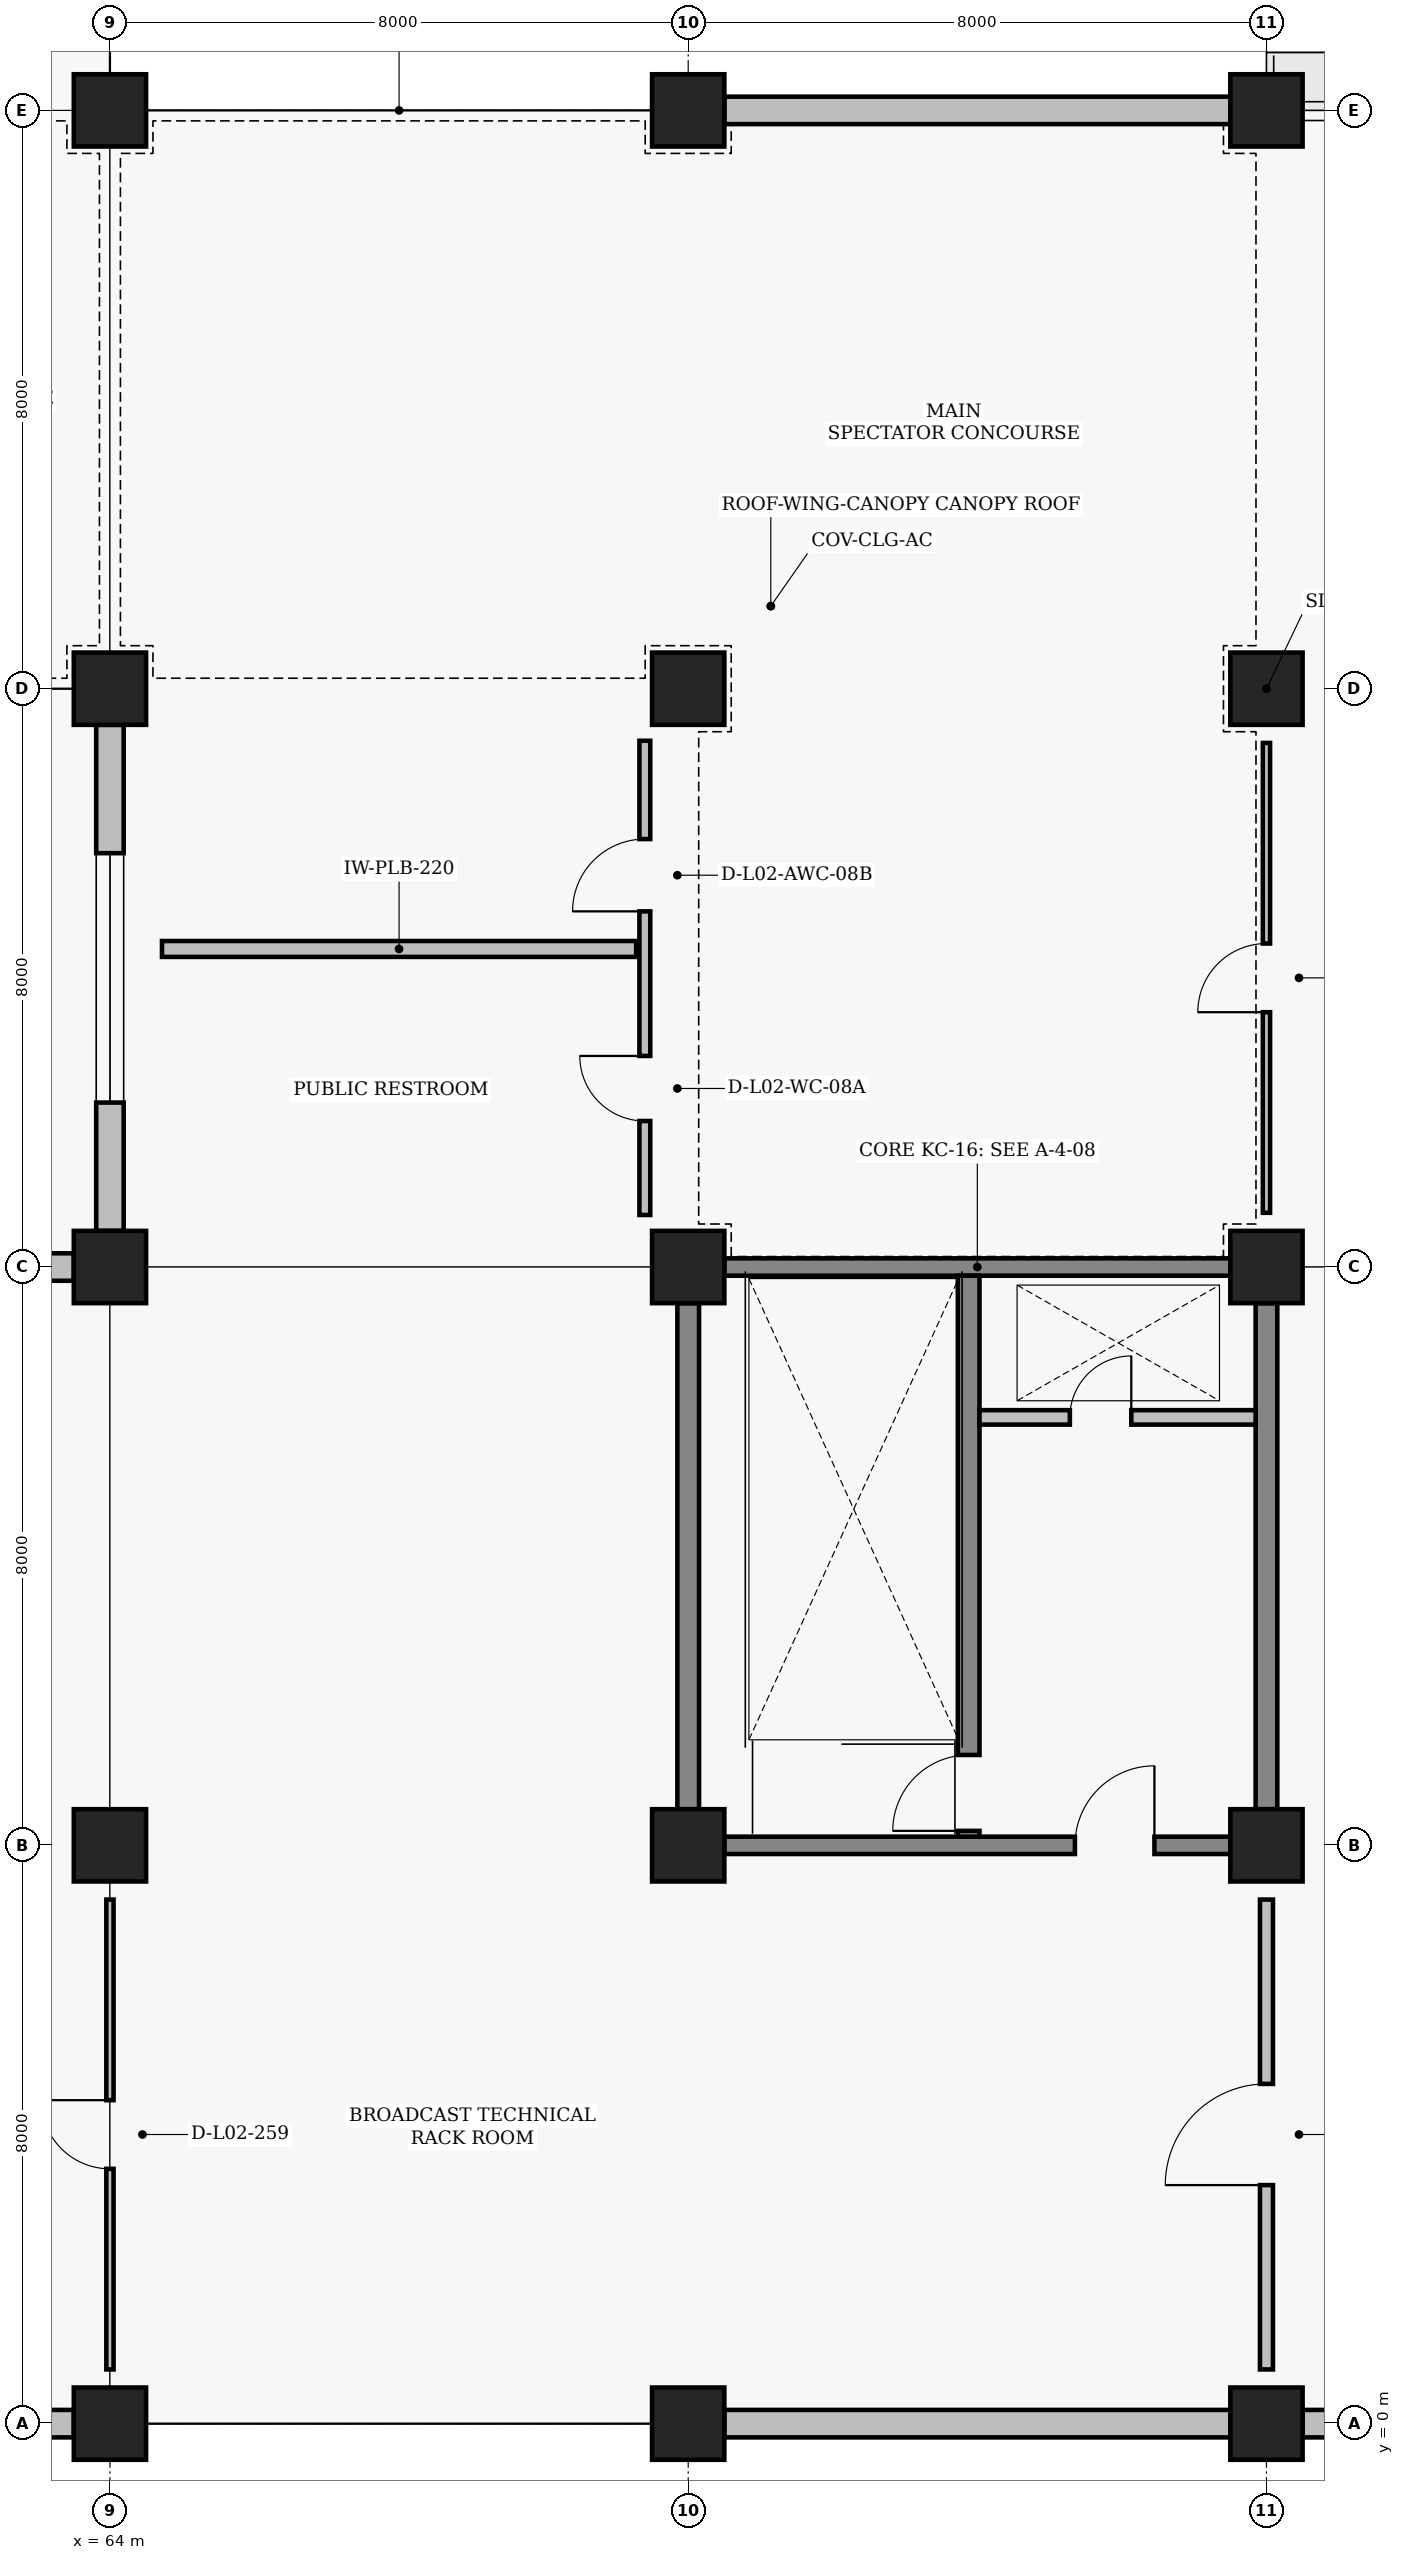
"""IFC4 building model, lengths in metres.
Left out: names, types, materials, properties, quantities, classifications, styles, units other than length and angle.
Written with IfcOpenShell. Run it as: python <this file> out.ifc"""

import sys

from ifc_helpers import new_model, si_unit, direction, frame, frame_2d, origin, origin_2d, place, context, subcontext, project, spatial, rectangle, extrude, element, fill, save


model = new_model("IFC4")
c1 = context("Model", 3, precision=1e-05, world=origin(), true_north=direction((0.0, 1.0)))
c2 = subcontext(c1, "Body", "Model", "MODEL_VIEW")
j1 = project(units=[si_unit("LENGTHUNIT", "METRE"), si_unit("PLANEANGLEUNIT", "RADIAN")], contexts=[c1])
p1 = place(None, origin())
s1 = spatial("IfcSite", under=j1, at=p1, CompositionType="ELEMENT")
p2 = place(p1, origin())
s2 = spatial("IfcBuilding", under=s1, at=p2, CompositionType="ELEMENT")
p3 = place(p2, frame((0.0, 0.0, 4.8)))
s3 = spatial("IfcBuildingStorey", under=s2, at=p3, CompositionType="ELEMENT", Elevation=4.8)
for number, where, z_axis, x_axis in (
    (1, (64.0, 0.0, 0.0), (0.0, 0.0, 1.0), (1.0, 0.0, 0.0)),
    (2, (64.0, 8.0, 0.0), (0.0, 0.0, 1.0), (1.0, 0.0, 0.0)),
    (3, (64.0, 16.0, 0.0), (0.0, 0.0, 1.0), (1.0, 0.0, 0.0)),
    (4, (64.0, 24.0, 0.0), (0.0, 0.0, 1.0), (1.0, 0.0, 0.0)),
    (5, (64.0, 32.0, 0.0), (0.0, 0.0, 1.0), (1.0, 0.0, 0.0)),
    (6, (72.0, 0.0, 0.0), (0.0, 0.0, 1.0), (1.0, 0.0, 0.0)),
    (7, (72.0, 8.0, 0.0), (0.0, 0.0, 1.0), (1.0, 0.0, 0.0)),
    (8, (72.0, 16.0, 0.0), (0.0, 0.0, 1.0), (1.0, 0.0, 0.0)),
    (9, (72.0, 24.0, 0.0), (0.0, 0.0, 1.0), (1.0, 0.0, 0.0)),
    (10, (72.0, 32.0, 0.0), (0.0, 0.0, 1.0), (1.0, 0.0, 0.0)),
    (11, (80.0, 0.0, 0.0), (0.0, 0.0, 1.0), (1.0, 0.0, 0.0)),
    (12, (80.0, 8.0, 0.0), (0.0, 0.0, 1.0), (1.0, 0.0, 0.0)),
    (13, (80.0, 16.0, 0.0), (0.0, 0.0, 1.0), (1.0, 0.0, 0.0)),
    (14, (80.0, 24.0, 0.0), (0.0, 0.0, 1.0), (1.0, 0.0, 0.0)),
    (15, (80.0, 32.0, 0.0), (0.0, 0.0, 1.0), (1.0, 0.0, 0.0)),
):
    element("IfcColumn", number, at=place(p3, frame(where, z_axis=z_axis, x_axis=x_axis)), inside=s3, PredefinedType="COLUMN", context=c2, shape_type="SweptSolid", body=[
        extrude(rectangle(XDim=1.0, YDim=1.0, at=origin_2d()), origin(), (0.0, 0.0, 1.0), 4.8),
    ])
p4 = place(p3, frame((56.5, 0.0, 0.0), z_axis=(0.0, 0.0, 1.0), x_axis=(1.0, 0.0, 0.0)))
e16 = element("IfcWall", 16, at=p4, inside=s3, PredefinedType="SOLIDWALL", context=c2, shape_type="SweptSolid", body=[
    extrude(rectangle(XDim=7.0, YDim=0.38, at=frame_2d((3.5, 0.0))), origin(), (0.0, 0.0, 1.0), 3.95),
])
p5 = place(p3, frame((56.5, 16.0, 0.0), z_axis=(0.0, 0.0, 1.0), x_axis=(1.0, 0.0, 0.0)))
e17 = element("IfcWall", 17, at=p5, inside=s3, PredefinedType="SOLIDWALL", context=c2, shape_type="SweptSolid", body=[
    extrude(rectangle(XDim=7.0, YDim=0.38, at=frame_2d((3.5, 0.0))), origin(), (0.0, 0.0, 1.0), 3.91),
])
p6 = place(p3, frame((64.0, 16.5, 0.0), z_axis=(0.0, 0.0, 1.0), x_axis=(0.0, 1.0, 0.0)))
e18 = element("IfcWall", 18, at=p6, inside=s3, PredefinedType="SOLIDWALL", context=c2, shape_type="SweptSolid", body=[
    extrude(rectangle(XDim=7.0, YDim=0.38, at=frame_2d((3.5, 0.0))), origin(), (0.0, 0.0, 1.0), 3.91),
])
p7 = place(p6, frame((1.775, 0.0, 0.95)))
e19 = element("IfcOpeningElement", 19, at=p7, cuts=e18, PredefinedType="OPENING", context=c2, shape_type="SweptSolid", body=[
    extrude(rectangle(XDim=3.45, YDim=2.2, at=frame_2d((1.725, 1.1))), frame((0.0, 0.2, 0.0), z_axis=(0.0, -1.0, 0.0), x_axis=(1.0, 0.0, 0.0)), (0.0, 0.0, 1.0), 0.4),
])
p8 = place(p3, frame((72.5, 0.0, 0.0), z_axis=(0.0, 0.0, 1.0), x_axis=(1.0, 0.0, 0.0)))
e20 = element("IfcWall", 20, at=p8, inside=s3, PredefinedType="SOLIDWALL", context=c2, shape_type="SweptSolid", body=[
    extrude(rectangle(XDim=7.0, YDim=0.38, at=frame_2d((3.5, 0.0))), origin(), (0.0, 0.0, 1.0), 3.95),
])
p9 = place(p3, frame((72.5, 32.0, 0.0), z_axis=(0.0, 0.0, 1.0), x_axis=(1.0, 0.0, 0.0)))
e21 = element("IfcWall", 21, at=p9, inside=s3, PredefinedType="SOLIDWALL", context=c2, shape_type="SweptSolid", body=[
    extrude(rectangle(XDim=7.0, YDim=0.38, at=frame_2d((3.5, 0.0))), origin(), (0.0, 0.0, 1.0), 3.91),
])
p10 = place(p3, frame((80.5, 0.0, 0.0), z_axis=(0.0, 0.0, 1.0), x_axis=(1.0, 0.0, 0.0)))
e22 = element("IfcWall", 22, at=p10, inside=s3, PredefinedType="SOLIDWALL", context=c2, shape_type="SweptSolid", body=[
    extrude(rectangle(XDim=7.0, YDim=0.38, at=frame_2d((3.5, 0.0))), origin(), (0.0, 0.0, 1.0), 3.95),
])
p11 = place(p10, frame((2.1, 0.0, 1.9)))
e23 = element("IfcOpeningElement", 23, at=p11, cuts=e22, PredefinedType="OPENING", context=c2, shape_type="SweptSolid", body=[
    extrude(rectangle(XDim=2.8, YDim=1.1, at=frame_2d((1.4, 0.55))), frame((0.0, 0.2, 0.0), z_axis=(0.0, -1.0, 0.0), x_axis=(1.0, 0.0, 0.0)), (0.0, 0.0, 1.0), 0.4),
])
p12 = place(p3, frame((72.5, 8.0, 0.0), z_axis=(0.0, 0.0, 1.0), x_axis=(1.0, 0.0, 0.0)))
e24 = element("IfcWall", 24, at=p12, inside=s3, PredefinedType="SHEAR", context=c2, shape_type="SweptSolid", body=[
    extrude(rectangle(XDim=7.0, YDim=0.24, at=frame_2d((3.5, 0.0))), origin(), (0.0, 0.0, 1.0), 3.97),
])
p13 = place(p12, frame((4.85, 0.0, 0.0)))
e25 = element("IfcOpeningElement", 25, at=p13, cuts=e24, PredefinedType="OPENING", context=c2, shape_type="SweptSolid", body=[
    extrude(rectangle(XDim=1.1, YDim=2.2, at=frame_2d((0.55, 1.1))), frame((0.0, 0.13, 0.0), z_axis=(0.0, -1.0, 0.0), x_axis=(1.0, 0.0, 0.0)), (0.0, 0.0, 1.0), 0.26),
])
p14 = place(p3, frame((72.5, 16.0, 0.0), z_axis=(0.0, 0.0, 1.0), x_axis=(1.0, 0.0, 0.0)))
e26 = element("IfcWall", 26, at=p14, inside=s3, PredefinedType="SHEAR", context=c2, shape_type="SweptSolid", body=[
    extrude(rectangle(XDim=7.0, YDim=0.24, at=frame_2d((3.5, 0.0))), origin(), (0.0, 0.0, 1.0), 3.61),
])
p15 = place(p3, frame((72.0, 8.5, 0.0), z_axis=(0.0, 0.0, 1.0), x_axis=(0.0, 1.0, 0.0)))
e27 = element("IfcWall", 27, at=p15, inside=s3, PredefinedType="SHEAR", context=c2, shape_type="SweptSolid", body=[
    extrude(rectangle(XDim=7.0, YDim=0.3, at=frame_2d((3.5, 0.0))), origin(), (0.0, 0.0, 1.0), 3.91),
])
p16 = place(p3, frame((80.0, 8.5, 0.0), z_axis=(0.0, 0.0, 1.0), x_axis=(0.0, 1.0, 0.0)))
e28 = element("IfcWall", 28, at=p16, inside=s3, PredefinedType="SHEAR", context=c2, shape_type="SweptSolid", body=[
    extrude(rectangle(XDim=7.0, YDim=0.3, at=frame_2d((3.5, 0.0))), origin(), (0.0, 0.0, 1.0), 3.61),
])
p17 = place(p3, frame((75.88, 8.12, 0.0), z_axis=(0.0, 0.0, 1.0), x_axis=(0.0, 1.0, 0.0)))
e29 = element("IfcWall", 29, at=p17, inside=s3, PredefinedType="SHEAR", context=c2, shape_type="SweptSolid", body=[
    extrude(rectangle(XDim=7.76, YDim=0.3, at=frame_2d((3.88, 0.0))), origin(), (0.0, 0.0, 1.0), 4.01),
])
p18 = place(p17, frame((0.08, 0.0, 0.0)))
e30 = element("IfcOpeningElement", 30, at=p18, cuts=e29, PredefinedType="OPENING", context=c2, shape_type="SweptSolid", body=[
    extrude(rectangle(XDim=1.05, YDim=2.15, at=frame_2d((0.525, 1.075))), frame((0.0, 0.16, 0.0), z_axis=(0.0, -1.0, 0.0), x_axis=(1.0, 0.0, 0.0)), (0.0, 0.0, 1.0), 0.32),
])
p19 = place(p3, frame((76.03, 13.92, 0.0), z_axis=(0.0, 0.0, 1.0), x_axis=(1.0, 0.0, 0.0)))
e31 = element("IfcWall", 31, at=p19, inside=s3, PredefinedType="PARTITIONING", context=c2, shape_type="SweptSolid", body=[
    extrude(rectangle(XDim=3.82, YDim=0.2, at=frame_2d((1.91, 0.0))), origin(), (0.0, 0.0, 1.0), 3.97),
])
p20 = place(p19, frame((1.25, 0.0, 0.0)))
e32 = element("IfcOpeningElement", 32, at=p20, cuts=e31, PredefinedType="OPENING", context=c2, shape_type="SweptSolid", body=[
    extrude(rectangle(XDim=0.85, YDim=2.05, at=frame_2d((0.425, 1.025))), frame((0.0, 0.11, 0.0), z_axis=(0.0, -1.0, 0.0), x_axis=(1.0, 0.0, 0.0)), (0.0, 0.0, 1.0), 0.22),
])
p21 = place(p3, frame((64.72, 20.4, 0.0), z_axis=(0.0, 0.0, 1.0), x_axis=(1.0, 0.0, 0.0)))
e33 = element("IfcWall", 33, at=p21, inside=s3, PredefinedType="PLUMBINGWALL", context=c2, shape_type="SweptSolid", body=[
    extrude(rectangle(XDim=6.56, YDim=0.22, at=frame_2d((3.28, 0.0))), origin(), (0.0, 0.0, 1.0), 4.11),
])
p22 = place(p3, frame((71.4, 16.72, 0.0), z_axis=(0.0, 0.0, 1.0), x_axis=(0.0, 1.0, 0.0)))
e34 = element("IfcWall", 34, at=p22, inside=s3, PredefinedType="PARTITIONING", context=c2, shape_type="SweptSolid", body=[
    extrude(rectangle(XDim=6.56, YDim=0.15, at=frame_2d((3.28, 0.0))), origin(), (0.0, 0.0, 1.0), 3.61),
])
p23 = place(p22, frame((1.3, 0.0, 0.0)))
e35 = element("IfcOpeningElement", 35, at=p23, cuts=e34, PredefinedType="OPENING", context=c2, shape_type="SweptSolid", body=[
    extrude(rectangle(XDim=0.9, YDim=2.1, at=frame_2d((0.45, 1.05))), frame((0.0, 0.085, 0.0), z_axis=(0.0, -1.0, 0.0), x_axis=(1.0, 0.0, 0.0)), (0.0, 0.0, 1.0), 0.17),
])
p24 = place(p22, frame((4.2, 0.0, 0.0)))
e36 = element("IfcOpeningElement", 36, at=p24, cuts=e34, PredefinedType="OPENING", context=c2, shape_type="SweptSolid", body=[
    extrude(rectangle(XDim=1.0, YDim=2.15, at=frame_2d((0.5, 1.075))), frame((0.0, 0.085, 0.0), z_axis=(0.0, -1.0, 0.0), x_axis=(1.0, 0.0, 0.0)), (0.0, 0.0, 1.0), 0.17),
])
p25 = place(p3, frame((80.0, 16.75, 0.0), z_axis=(0.0, 0.0, 1.0), x_axis=(0.0, 1.0, 0.0)))
e37 = element("IfcWall", 37, at=p25, inside=s3, PredefinedType="PARTITIONING", context=c2, shape_type="SweptSolid", body=[
    extrude(rectangle(XDim=6.5, YDim=0.1, at=frame_2d((3.25, 0.0))), origin(), (0.0, 0.0, 1.0), 3.91),
])
p26 = place(p25, frame((2.775, 0.0, 0.0)))
e38 = element("IfcOpeningElement", 38, at=p26, cuts=e37, PredefinedType="OPENING", context=c2, shape_type="SweptSolid", body=[
    extrude(rectangle(XDim=0.95, YDim=2.1, at=frame_2d((0.475, 1.05))), frame((0.0, 0.06, 0.0), z_axis=(0.0, -1.0, 0.0), x_axis=(1.0, 0.0, 0.0)), (0.0, 0.0, 1.0), 0.12),
])
p27 = place(p3, frame((64.0, 0.75, 0.0), z_axis=(0.0, 0.0, 1.0), x_axis=(0.0, 1.0, 0.0)))
e39 = element("IfcWall", 39, at=p27, inside=s3, PredefinedType="PARTITIONING", context=c2, shape_type="SweptSolid", body=[
    extrude(rectangle(XDim=6.5, YDim=0.1, at=frame_2d((3.25, 0.0))), origin(), (0.0, 0.0, 1.0), 3.97),
])
p28 = place(p27, frame((2.775, 0.0, 0.0)))
e40 = element("IfcOpeningElement", 40, at=p28, cuts=e39, PredefinedType="OPENING", context=c2, shape_type="SweptSolid", body=[
    extrude(rectangle(XDim=0.95, YDim=2.1, at=frame_2d((0.475, 1.05))), frame((0.0, 0.06, 0.0), z_axis=(0.0, -1.0, 0.0), x_axis=(1.0, 0.0, 0.0)), (0.0, 0.0, 1.0), 0.12),
])
p29 = place(p3, frame((80.0, 0.75, 0.0), z_axis=(0.0, 0.0, 1.0), x_axis=(0.0, 1.0, 0.0)))
e41 = element("IfcWall", 41, at=p29, inside=s3, PredefinedType="PARTITIONING", context=c2, shape_type="SweptSolid", body=[
    extrude(rectangle(XDim=6.5, YDim=0.18, at=frame_2d((3.25, 0.0))), origin(), (0.0, 0.0, 1.0), 3.97),
])
p30 = place(p29, frame((2.55, 0.0, 0.0)))
e42 = element("IfcOpeningElement", 42, at=p30, cuts=e41, PredefinedType="OPENING", context=c2, shape_type="SweptSolid", body=[
    extrude(rectangle(XDim=1.4, YDim=2.2, at=frame_2d((0.7, 1.1))), frame((0.0, 0.1, 0.0), z_axis=(0.0, -1.0, 0.0), x_axis=(1.0, 0.0, 0.0)), (0.0, 0.0, 1.0), 0.2),
])
p31 = place(p7, origin())
e43 = element("IfcWindow", 43, at=p31, inside=s3, PartitioningType="SINGLE_PANEL", PredefinedType="WINDOW", context=c2, shape_type="SweptSolid", body=[
    extrude(rectangle(XDim=3.45, YDim=2.2, at=frame_2d((1.725, 1.1))), frame((0.0, 0.03, 0.0), z_axis=(0.0, -1.0, 0.0), x_axis=(1.0, 0.0, 0.0)), (0.0, 0.0, 1.0), 0.06),
])
fill(e19, e43)
p32 = place(p13, origin())
e44 = element("IfcDoor", 44, at=p32, inside=s3, OperationType="SINGLE_SWING_RIGHT", PredefinedType="DOOR", context=c2, shape_type="SweptSolid", body=[
    extrude(rectangle(XDim=1.1, YDim=2.2, at=frame_2d((0.55, 1.1))), frame((0.0, 0.025, 0.0), z_axis=(0.0, -1.0, 0.0), x_axis=(1.0, 0.0, 0.0)), (0.0, 0.0, 1.0), 0.05),
])
fill(e25, e44)
p33 = place(p18, origin())
e45 = element("IfcDoor", 45, at=p33, inside=s3, OperationType="SINGLE_SWING_LEFT", PredefinedType="DOOR", context=c2, shape_type="SweptSolid", body=[
    extrude(rectangle(XDim=1.05, YDim=2.15, at=frame_2d((0.525, 1.075))), frame((0.0, 0.025, 0.0), z_axis=(0.0, -1.0, 0.0), x_axis=(1.0, 0.0, 0.0)), (0.0, 0.0, 1.0), 0.05),
])
fill(e30, e45)
p34 = place(p20, origin())
e46 = element("IfcDoor", 46, at=p34, inside=s3, OperationType="SINGLE_SWING_RIGHT", PredefinedType="TRAPDOOR", context=c2, shape_type="SweptSolid", body=[
    extrude(rectangle(XDim=0.85, YDim=2.05, at=frame_2d((0.425, 1.025))), frame((0.0, 0.025, 0.0), z_axis=(0.0, -1.0, 0.0), x_axis=(1.0, 0.0, 0.0)), (0.0, 0.0, 1.0), 0.05),
])
fill(e32, e46)
p35 = place(p23, origin())
e47 = element("IfcDoor", 47, at=p35, inside=s3, OperationType="SINGLE_SWING_RIGHT", PredefinedType="DOOR", context=c2, shape_type="SweptSolid", body=[
    extrude(rectangle(XDim=0.9, YDim=2.1, at=frame_2d((0.45, 1.05))), frame((0.0, 0.025, 0.0), z_axis=(0.0, -1.0, 0.0), x_axis=(1.0, 0.0, 0.0)), (0.0, 0.0, 1.0), 0.05),
])
fill(e35, e47)
p36 = place(p24, origin())
e48 = element("IfcDoor", 48, at=p36, inside=s3, OperationType="SINGLE_SWING_LEFT", PredefinedType="DOOR", context=c2, shape_type="SweptSolid", body=[
    extrude(rectangle(XDim=1.0, YDim=2.15, at=frame_2d((0.5, 1.075))), frame((0.0, 0.025, 0.0), z_axis=(0.0, -1.0, 0.0), x_axis=(1.0, 0.0, 0.0)), (0.0, 0.0, 1.0), 0.05),
])
fill(e36, e48)
p37 = place(p26, origin())
e49 = element("IfcDoor", 49, at=p37, inside=s3, OperationType="SINGLE_SWING_LEFT", PredefinedType="DOOR", context=c2, shape_type="SweptSolid", body=[
    extrude(rectangle(XDim=0.95, YDim=2.1, at=frame_2d((0.475, 1.05))), frame((0.0, 0.025, 0.0), z_axis=(0.0, -1.0, 0.0), x_axis=(1.0, 0.0, 0.0)), (0.0, 0.0, 1.0), 0.05),
])
fill(e38, e49)
p38 = place(p28, origin())
e50 = element("IfcDoor", 50, at=p38, inside=s3, OperationType="SINGLE_SWING_RIGHT", PredefinedType="DOOR", context=c2, shape_type="SweptSolid", body=[
    extrude(rectangle(XDim=0.95, YDim=2.1, at=frame_2d((0.475, 1.05))), frame((0.0, 0.025, 0.0), z_axis=(0.0, -1.0, 0.0), x_axis=(1.0, 0.0, 0.0)), (0.0, 0.0, 1.0), 0.05),
])
fill(e40, e50)
p39 = place(p30, origin())
e51 = element("IfcDoor", 51, at=p39, inside=s3, OperationType="SINGLE_SWING_LEFT", PredefinedType="DOOR", context=c2, shape_type="SweptSolid", body=[
    extrude(rectangle(XDim=1.4, YDim=2.2, at=frame_2d((0.7, 1.1))), frame((0.0, 0.025, 0.0), z_axis=(0.0, -1.0, 0.0), x_axis=(1.0, 0.0, 0.0)), (0.0, 0.0, 1.0), 0.05),
])
fill(e42, e51)
save(model, sys.argv[1])
